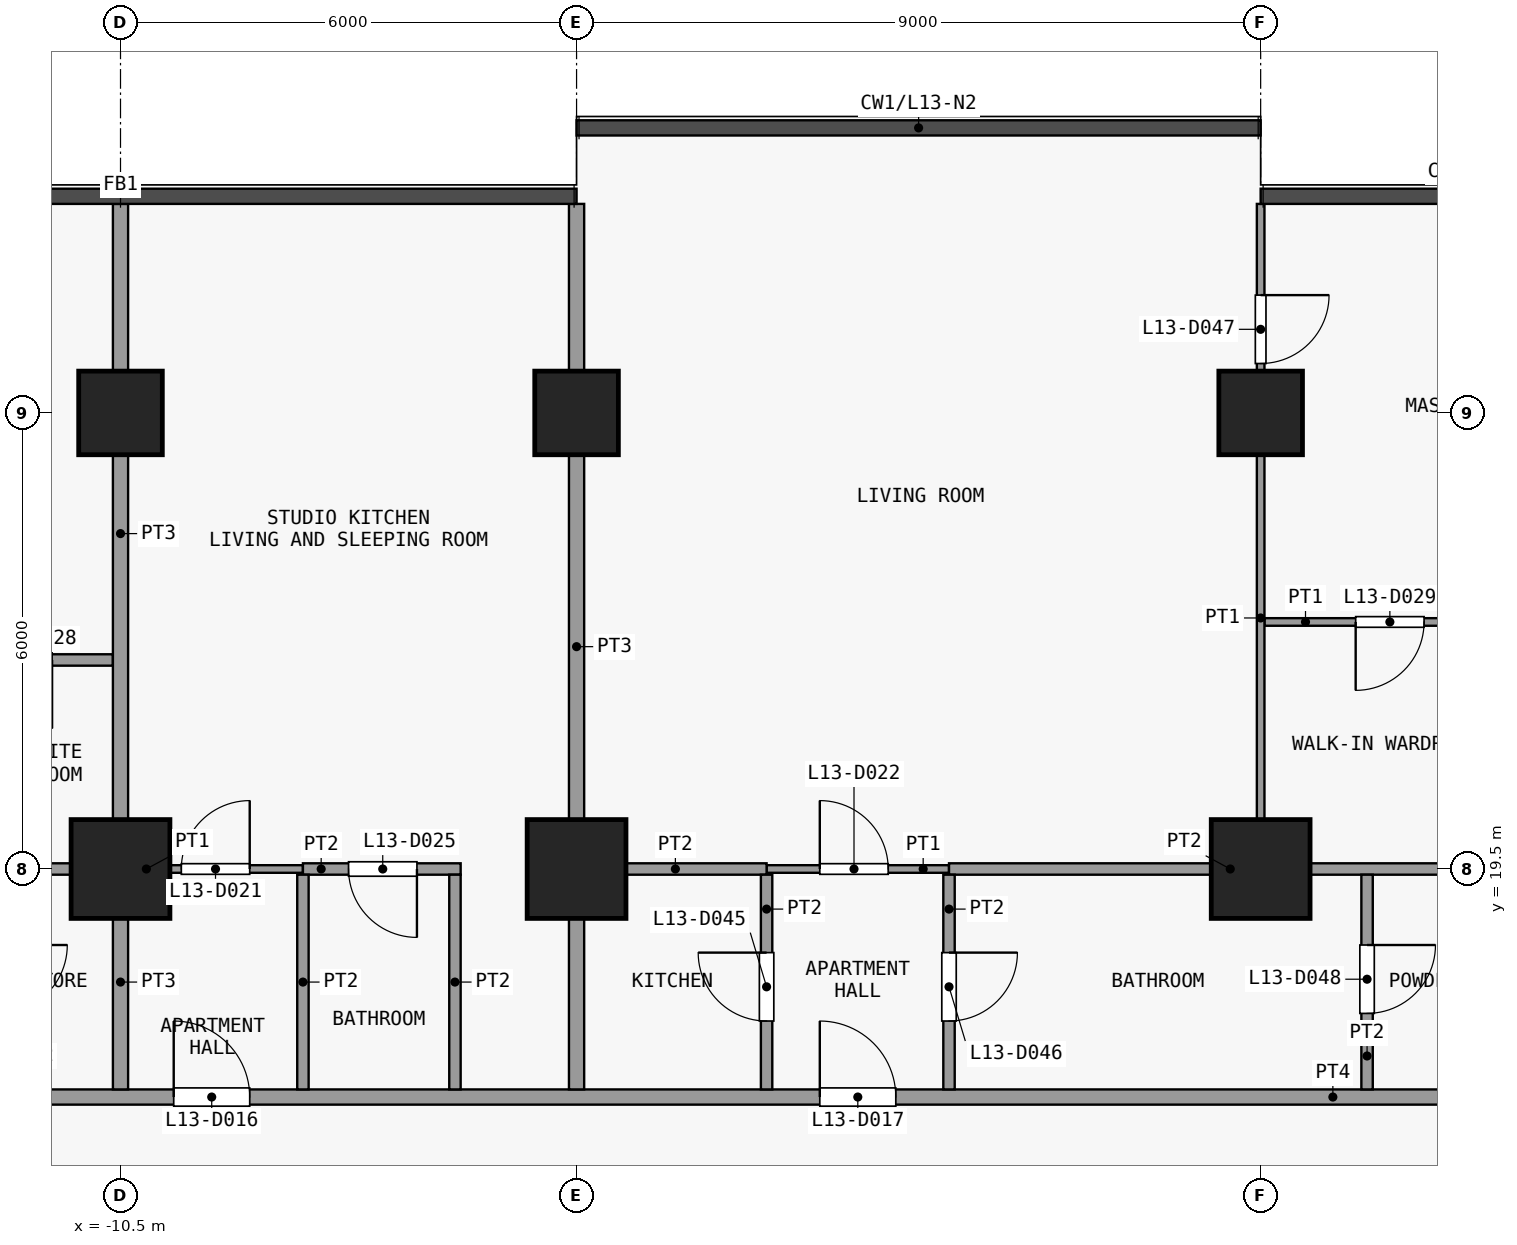
"""IFC4 building model, lengths in metres.
Left out: names, types, materials, properties, quantities, classifications, styles, units other than length and angle.
Written with IfcOpenShell. Run it as: python <this file> out.ifc"""

import sys

from ifc_helpers import new_model, si_unit, direction, frame, frame_2d, origin, origin_2d, place, context, subcontext, project, spatial, rectangle, extrude, element, fill, save


model = new_model("IFC4")
c1 = context("Model", 3, precision=1e-05, world=origin(), true_north=direction((0.0, 1.0)))
c2 = subcontext(c1, "Body", "Model", "MODEL_VIEW")
j1 = project(units=[si_unit("LENGTHUNIT", "METRE"), si_unit("PLANEANGLEUNIT", "RADIAN")], contexts=[c1])
p1 = place(None, origin())
s1 = spatial("IfcSite", under=j1, at=p1, CompositionType="ELEMENT")
p2 = place(p1, origin())
s2 = spatial("IfcBuilding", under=s1, at=p2, CompositionType="ELEMENT")
p3 = place(p2, frame((0.0, 0.0, 57.7)))
s3 = spatial("IfcBuildingStorey", under=s2, at=p3, CompositionType="ELEMENT", Elevation=57.7)
p4 = place(p3, frame((-10.5, 19.5, 0.0), z_axis=(0.0, 0.0, 1.0), x_axis=(1.0, 0.0, 0.0)))
e1 = element("IfcColumn", 1, at=p4, inside=s3, PredefinedType="COLUMN", context=c2, shape_type="SweptSolid", body=[
    extrude(rectangle(XDim=1.3, YDim=1.3, at=origin_2d()), origin(), (0.0, 0.0, 1.0), 3.6),
])
p5 = place(p3, frame((-10.5, 25.5, 0.0), z_axis=(0.0, 0.0, 1.0), x_axis=(1.0, 0.0, 0.0)))
e2 = element("IfcColumn", 2, at=p5, inside=s3, PredefinedType="COLUMN", context=c2, shape_type="SweptSolid", body=[
    extrude(rectangle(XDim=1.1, YDim=1.1, at=origin_2d()), origin(), (0.0, 0.0, 1.0), 3.6),
])
p6 = place(p3, frame((-4.5, 19.5, 0.0), z_axis=(0.0, 0.0, 1.0), x_axis=(1.0, 0.0, 0.0)))
e3 = element("IfcColumn", 3, at=p6, inside=s3, PredefinedType="COLUMN", context=c2, shape_type="SweptSolid", body=[
    extrude(rectangle(XDim=1.3, YDim=1.3, at=origin_2d()), origin(), (0.0, 0.0, 1.0), 3.6),
])
p7 = place(p3, frame((-4.5, 25.5, 0.0), z_axis=(0.0, 0.0, 1.0), x_axis=(1.0, 0.0, 0.0)))
e4 = element("IfcColumn", 4, at=p7, inside=s3, PredefinedType="COLUMN", context=c2, shape_type="SweptSolid", body=[
    extrude(rectangle(XDim=1.1, YDim=1.1, at=origin_2d()), origin(), (0.0, 0.0, 1.0), 3.6),
])
p8 = place(p3, frame((4.5, 19.5, 0.0), z_axis=(0.0, 0.0, 1.0), x_axis=(1.0, 0.0, 0.0)))
e5 = element("IfcColumn", 5, at=p8, inside=s3, PredefinedType="COLUMN", context=c2, shape_type="SweptSolid", body=[
    extrude(rectangle(XDim=1.3, YDim=1.3, at=origin_2d()), origin(), (0.0, 0.0, 1.0), 3.6),
])
p9 = place(p3, frame((4.5, 25.5, 0.0), z_axis=(0.0, 0.0, 1.0), x_axis=(1.0, 0.0, 0.0)))
e6 = element("IfcColumn", 6, at=p9, inside=s3, PredefinedType="COLUMN", context=c2, shape_type="SweptSolid", body=[
    extrude(rectangle(XDim=1.1, YDim=1.1, at=origin_2d()), origin(), (0.0, 0.0, 1.0), 3.6),
])
p10 = place(p3, frame((-25.35, 16.5, 0.0), z_axis=(0.0, 0.0, 1.0), x_axis=(1.0, 0.0, 0.0)))
e7 = element("IfcWall", 7, at=p10, inside=s3, PredefinedType="PARTITIONING", context=c2, shape_type="SweptSolid", body=[
    extrude(rectangle(XDim=50.7, YDim=0.2, at=frame_2d((25.35, 0.0))), origin(), (0.0, 0.0, 1.0), 3.3),
])
p11 = place(p10, frame((7.05, 0.0, 0.0)))
e8 = element("IfcOpeningElement", 8, at=p11, cuts=e7, PredefinedType="OPENING", context=c2, shape_type="SweptSolid", body=[
    extrude(rectangle(XDim=1.0, YDim=2.1, at=frame_2d((0.5, 1.05))), frame((0.0, 0.11, 0.0), z_axis=(0.0, -1.0, 0.0), x_axis=(1.0, 0.0, 0.0)), (0.0, 0.0, 1.0), 0.22),
])
p12 = place(p10, frame((15.55, 0.0, 0.0)))
e9 = element("IfcOpeningElement", 9, at=p12, cuts=e7, PredefinedType="OPENING", context=c2, shape_type="SweptSolid", body=[
    extrude(rectangle(XDim=1.0, YDim=2.1, at=frame_2d((0.5, 1.05))), frame((0.0, 0.11, 0.0), z_axis=(0.0, -1.0, 0.0), x_axis=(1.0, 0.0, 0.0)), (0.0, 0.0, 1.0), 0.22),
])
p13 = place(p10, frame((24.05, 0.0, 0.0)))
e10 = element("IfcOpeningElement", 10, at=p13, cuts=e7, PredefinedType="OPENING", context=c2, shape_type="SweptSolid", body=[
    extrude(rectangle(XDim=1.0, YDim=2.1, at=frame_2d((0.5, 1.05))), frame((0.0, 0.11, 0.0), z_axis=(0.0, -1.0, 0.0), x_axis=(1.0, 0.0, 0.0)), (0.0, 0.0, 1.0), 0.22),
])
p14 = place(p10, frame((36.55, 0.0, 0.0)))
e11 = element("IfcOpeningElement", 11, at=p14, cuts=e7, PredefinedType="OPENING", context=c2, shape_type="SweptSolid", body=[
    extrude(rectangle(XDim=1.0, YDim=2.1, at=frame_2d((0.5, 1.05))), frame((0.0, 0.11, 0.0), z_axis=(0.0, -1.0, 0.0), x_axis=(1.0, 0.0, 0.0)), (0.0, 0.0, 1.0), 0.22),
])
p15 = place(p10, frame((45.05, 0.0, 0.0)))
e12 = element("IfcOpeningElement", 12, at=p15, cuts=e7, PredefinedType="OPENING", context=c2, shape_type="SweptSolid", body=[
    extrude(rectangle(XDim=1.0, YDim=2.1, at=frame_2d((0.5, 1.05))), frame((0.0, 0.11, 0.0), z_axis=(0.0, -1.0, 0.0), x_axis=(1.0, 0.0, 0.0)), (0.0, 0.0, 1.0), 0.22),
])
p16 = place(p3, frame((-10.5, 19.5, 0.0), z_axis=(0.0, 0.0, 1.0), x_axis=(1.0, 0.0, 0.0)))
e13 = element("IfcWall", 13, at=p16, inside=s3, PredefinedType="PARTITIONING", context=c2, shape_type="SweptSolid", body=[
    extrude(rectangle(XDim=2.4, YDim=0.1, at=frame_2d((1.2, 0.0))), origin(), (0.0, 0.0, 1.0), 3.3),
])
p17 = place(p16, frame((0.8, 0.0, 0.0)))
e14 = element("IfcOpeningElement", 14, at=p17, cuts=e13, PredefinedType="OPENING", context=c2, shape_type="SweptSolid", body=[
    extrude(rectangle(XDim=0.9, YDim=2.1, at=frame_2d((0.45, 1.05))), frame((0.0, 0.06, 0.0), z_axis=(0.0, -1.0, 0.0), x_axis=(1.0, 0.0, 0.0)), (0.0, 0.0, 1.0), 0.12),
])
p18 = place(p3, frame((-2.0, 19.5, 0.0), z_axis=(0.0, 0.0, 1.0), x_axis=(1.0, 0.0, 0.0)))
e15 = element("IfcWall", 15, at=p18, inside=s3, PredefinedType="PARTITIONING", context=c2, shape_type="SweptSolid", body=[
    extrude(rectangle(XDim=2.4, YDim=0.1, at=frame_2d((1.2, 0.0))), origin(), (0.0, 0.0, 1.0), 3.3),
])
p19 = place(p18, frame((0.7, 0.0, 0.0)))
e16 = element("IfcOpeningElement", 16, at=p19, cuts=e15, PredefinedType="OPENING", context=c2, shape_type="SweptSolid", body=[
    extrude(rectangle(XDim=0.9, YDim=2.1, at=frame_2d((0.45, 1.05))), frame((0.0, 0.06, 0.0), z_axis=(0.0, -1.0, 0.0), x_axis=(1.0, 0.0, 0.0)), (0.0, 0.0, 1.0), 0.12),
])
p20 = place(p3, frame((-13.2, 19.5, 0.0), z_axis=(0.0, 0.0, 1.0), x_axis=(1.0, 0.0, 0.0)))
e17 = element("IfcWall", 17, at=p20, inside=s3, PredefinedType="PARTITIONING", context=c2, shape_type="SweptSolid", body=[
    extrude(rectangle(XDim=2.7, YDim=0.15, at=frame_2d((1.35, 0.0))), origin(), (0.0, 0.0, 1.0), 3.3),
])
p21 = place(p3, frame((-8.1, 19.5, 0.0), z_axis=(0.0, 0.0, 1.0), x_axis=(1.0, 0.0, 0.0)))
e18 = element("IfcWall", 18, at=p21, inside=s3, PredefinedType="PARTITIONING", context=c2, shape_type="SweptSolid", body=[
    extrude(rectangle(XDim=2.075, YDim=0.15, at=frame_2d((1.038, 0.0))), origin(), (0.0, 0.0, 1.0), 3.3),
])
p22 = place(p21, frame((0.6, 0.0, 0.0)))
e19 = element("IfcOpeningElement", 19, at=p22, cuts=e18, PredefinedType="OPENING", context=c2, shape_type="SweptSolid", body=[
    extrude(rectangle(XDim=0.9, YDim=2.1, at=frame_2d((0.45, 1.05))), frame((0.0, 0.085, 0.0), z_axis=(0.0, -1.0, 0.0), x_axis=(1.0, 0.0, 0.0)), (0.0, 0.0, 1.0), 0.17),
])
p23 = place(p3, frame((-4.4, 19.5, 0.0), z_axis=(0.0, 0.0, 1.0), x_axis=(1.0, 0.0, 0.0)))
e20 = element("IfcWall", 20, at=p23, inside=s3, PredefinedType="PARTITIONING", context=c2, shape_type="SweptSolid", body=[
    extrude(rectangle(XDim=2.4, YDim=0.15, at=frame_2d((1.2, 0.0))), origin(), (0.0, 0.0, 1.0), 3.3),
])
p24 = place(p3, frame((0.4, 19.5, 0.0), z_axis=(0.0, 0.0, 1.0), x_axis=(1.0, 0.0, 0.0)))
e21 = element("IfcWall", 21, at=p24, inside=s3, PredefinedType="PARTITIONING", context=c2, shape_type="SweptSolid", body=[
    extrude(rectangle(XDim=7.4, YDim=0.15, at=frame_2d((3.7, 0.0))), origin(), (0.0, 0.0, 1.0), 3.3),
])
p25 = place(p3, frame((-13.2, 22.25, 0.0), z_axis=(0.0, 0.0, 1.0), x_axis=(1.0, 0.0, 0.0)))
e22 = element("IfcWall", 22, at=p25, inside=s3, PredefinedType="PARTITIONING", context=c2, shape_type="SweptSolid", body=[
    extrude(rectangle(XDim=2.6, YDim=0.15, at=frame_2d((1.3, 0.0))), origin(), (0.0, 0.0, 1.0), 3.3),
])
p26 = place(p25, frame((0.9, 0.0, 0.0)))
e23 = element("IfcOpeningElement", 23, at=p26, cuts=e22, PredefinedType="OPENING", context=c2, shape_type="SweptSolid", body=[
    extrude(rectangle(XDim=0.9, YDim=2.1, at=frame_2d((0.45, 1.05))), frame((0.0, 0.085, 0.0), z_axis=(0.0, -1.0, 0.0), x_axis=(1.0, 0.0, 0.0)), (0.0, 0.0, 1.0), 0.17),
])
p27 = place(p3, frame((4.55, 22.75, 0.0), z_axis=(0.0, 0.0, 1.0), x_axis=(1.0, 0.0, 0.0)))
e24 = element("IfcWall", 24, at=p27, inside=s3, PredefinedType="PARTITIONING", context=c2, shape_type="SweptSolid", body=[
    extrude(rectangle(XDim=3.25, YDim=0.1, at=frame_2d((1.625, 0.0))), origin(), (0.0, 0.0, 1.0), 3.3),
])
p28 = place(p27, frame((1.2, 0.0, 0.0)))
e25 = element("IfcOpeningElement", 25, at=p28, cuts=e24, PredefinedType="OPENING", context=c2, shape_type="SweptSolid", body=[
    extrude(rectangle(XDim=0.9, YDim=2.1, at=frame_2d((0.45, 1.05))), frame((0.0, 0.06, 0.0), z_axis=(0.0, -1.0, 0.0), x_axis=(1.0, 0.0, 0.0)), (0.0, 0.0, 1.0), 0.12),
])
p29 = place(p3, frame((-10.5, 16.6, 0.0), z_axis=(0.0, 0.0, 1.0), x_axis=(0.0, 1.0, 0.0)))
e26 = element("IfcWall", 26, at=p29, inside=s3, PredefinedType="PARTITIONING", context=c2, shape_type="SweptSolid", body=[
    extrude(rectangle(XDim=2.825, YDim=0.2, at=frame_2d((1.413, 0.0))), origin(), (0.0, 0.0, 1.0), 3.3),
])
p30 = place(p3, frame((-10.5, 19.575, 0.0), z_axis=(0.0, 0.0, 1.0), x_axis=(0.0, 1.0, 0.0)))
e27 = element("IfcWall", 27, at=p30, inside=s3, PredefinedType="PARTITIONING", context=c2, shape_type="SweptSolid", body=[
    extrude(rectangle(XDim=8.675, YDim=0.2, at=frame_2d((4.337, 0.0))), origin(), (0.0, 0.0, 1.0), 3.3),
])
for number, where, z_axis, x_axis in (
    (28, (-8.1, 16.6, 0.0), (0.0, 0.0, 1.0), (0.0, 1.0, 0.0)),
    (29, (-6.1, 16.6, 0.0), (0.0, 0.0, 1.0), (0.0, 1.0, 0.0)),
):
    element("IfcWall", number, at=place(p3, frame(where, z_axis=z_axis, x_axis=x_axis)), inside=s3, PredefinedType="PARTITIONING", context=c2, shape_type="SweptSolid", body=[
        extrude(rectangle(XDim=2.825, YDim=0.15, at=frame_2d((1.413, 0.0))), origin(), (0.0, 0.0, 1.0), 3.3),
    ])
p31 = place(p3, frame((-4.5, 16.6, 0.0), z_axis=(0.0, 0.0, 1.0), x_axis=(0.0, 1.0, 0.0)))
e30 = element("IfcWall", 30, at=p31, inside=s3, PredefinedType="PARTITIONING", context=c2, shape_type="SweptSolid", body=[
    extrude(rectangle(XDim=11.65, YDim=0.2, at=frame_2d((5.825, 0.0))), origin(), (0.0, 0.0, 1.0), 3.3),
])
p32 = place(p3, frame((-2.0, 16.6, 0.0), z_axis=(0.0, 0.0, 1.0), x_axis=(0.0, 1.0, 0.0)))
e31 = element("IfcWall", 31, at=p32, inside=s3, PredefinedType="PARTITIONING", context=c2, shape_type="SweptSolid", body=[
    extrude(rectangle(XDim=2.825, YDim=0.15, at=frame_2d((1.413, 0.0))), origin(), (0.0, 0.0, 1.0), 3.3),
])
p33 = place(p32, frame((0.9, 0.0, 0.0)))
e32 = element("IfcOpeningElement", 32, at=p33, cuts=e31, PredefinedType="OPENING", context=c2, shape_type="SweptSolid", body=[
    extrude(rectangle(XDim=0.9, YDim=2.1, at=frame_2d((0.45, 1.05))), frame((0.0, 0.085, 0.0), z_axis=(0.0, -1.0, 0.0), x_axis=(1.0, 0.0, 0.0)), (0.0, 0.0, 1.0), 0.17),
])
p34 = place(p3, frame((0.4, 16.6, 0.0), z_axis=(0.0, 0.0, 1.0), x_axis=(0.0, 1.0, 0.0)))
e33 = element("IfcWall", 33, at=p34, inside=s3, PredefinedType="PARTITIONING", context=c2, shape_type="SweptSolid", body=[
    extrude(rectangle(XDim=2.825, YDim=0.15, at=frame_2d((1.413, 0.0))), origin(), (0.0, 0.0, 1.0), 3.3),
])
p35 = place(p34, frame((0.9, 0.0, 0.0)))
e34 = element("IfcOpeningElement", 34, at=p35, cuts=e33, PredefinedType="OPENING", context=c2, shape_type="SweptSolid", body=[
    extrude(rectangle(XDim=0.9, YDim=2.1, at=frame_2d((0.45, 1.05))), frame((0.0, 0.085, 0.0), z_axis=(0.0, -1.0, 0.0), x_axis=(1.0, 0.0, 0.0)), (0.0, 0.0, 1.0), 0.17),
])
p36 = place(p3, frame((4.5, 19.575, 0.0), z_axis=(0.0, 0.0, 1.0), x_axis=(0.0, 1.0, 0.0)))
e35 = element("IfcWall", 35, at=p36, inside=s3, PredefinedType="PARTITIONING", context=c2, shape_type="SweptSolid", body=[
    extrude(rectangle(XDim=8.675, YDim=0.1, at=frame_2d((4.337, 0.0))), origin(), (0.0, 0.0, 1.0), 3.3),
])
p37 = place(p36, frame((6.575, 0.0, 0.0)))
e36 = element("IfcOpeningElement", 36, at=p37, cuts=e35, PredefinedType="OPENING", context=c2, shape_type="SweptSolid", body=[
    extrude(rectangle(XDim=0.9, YDim=2.1, at=frame_2d((0.45, 1.05))), frame((0.0, 0.06, 0.0), z_axis=(0.0, -1.0, 0.0), x_axis=(1.0, 0.0, 0.0)), (0.0, 0.0, 1.0), 0.12),
])
p38 = place(p3, frame((5.9, 16.6, 0.0), z_axis=(0.0, 0.0, 1.0), x_axis=(0.0, 1.0, 0.0)))
e37 = element("IfcWall", 37, at=p38, inside=s3, PredefinedType="PARTITIONING", context=c2, shape_type="SweptSolid", body=[
    extrude(rectangle(XDim=2.825, YDim=0.15, at=frame_2d((1.413, 0.0))), origin(), (0.0, 0.0, 1.0), 3.3),
])
p39 = place(p38, frame((1.0, 0.0, 0.0)))
e38 = element("IfcOpeningElement", 38, at=p39, cuts=e37, PredefinedType="OPENING", context=c2, shape_type="SweptSolid", body=[
    extrude(rectangle(XDim=0.9, YDim=2.1, at=frame_2d((0.45, 1.05))), frame((0.0, 0.085, 0.0), z_axis=(0.0, -1.0, 0.0), x_axis=(1.0, 0.0, 0.0)), (0.0, 0.0, 1.0), 0.17),
])
p40 = place(p12, origin())
e39 = element("IfcDoor", 39, at=p40, inside=s3, OperationType="SINGLE_SWING_RIGHT", PredefinedType="DOOR", context=c2, shape_type="SweptSolid", body=[
    extrude(rectangle(XDim=1.0, YDim=2.1, at=frame_2d((0.5, 1.05))), frame((0.0, 0.025, 0.0), z_axis=(0.0, -1.0, 0.0), x_axis=(1.0, 0.0, 0.0)), (0.0, 0.0, 1.0), 0.05),
])
fill(e9, e39)
p41 = place(p13, origin())
e40 = element("IfcDoor", 40, at=p41, inside=s3, OperationType="SINGLE_SWING_RIGHT", PredefinedType="DOOR", context=c2, shape_type="SweptSolid", body=[
    extrude(rectangle(XDim=1.0, YDim=2.1, at=frame_2d((0.5, 1.05))), frame((0.0, 0.025, 0.0), z_axis=(0.0, -1.0, 0.0), x_axis=(1.0, 0.0, 0.0)), (0.0, 0.0, 1.0), 0.05),
])
fill(e10, e40)
p42 = place(p17, origin())
e41 = element("IfcDoor", 41, at=p42, inside=s3, OperationType="SINGLE_SWING_LEFT", PredefinedType="DOOR", context=c2, shape_type="SweptSolid", body=[
    extrude(rectangle(XDim=0.9, YDim=2.1, at=frame_2d((0.45, 1.05))), frame((0.0, 0.025, 0.0), z_axis=(0.0, -1.0, 0.0), x_axis=(1.0, 0.0, 0.0)), (0.0, 0.0, 1.0), 0.05),
])
fill(e14, e41)
p43 = place(p19, origin())
e42 = element("IfcDoor", 42, at=p43, inside=s3, OperationType="SINGLE_SWING_RIGHT", PredefinedType="DOOR", context=c2, shape_type="SweptSolid", body=[
    extrude(rectangle(XDim=0.9, YDim=2.1, at=frame_2d((0.45, 1.05))), frame((0.0, 0.025, 0.0), z_axis=(0.0, -1.0, 0.0), x_axis=(1.0, 0.0, 0.0)), (0.0, 0.0, 1.0), 0.05),
])
fill(e16, e42)
p44 = place(p22, origin())
e43 = element("IfcDoor", 43, at=p44, inside=s3, OperationType="SINGLE_SWING_RIGHT", PredefinedType="DOOR", context=c2, shape_type="SweptSolid", body=[
    extrude(rectangle(XDim=0.9, YDim=2.1, at=frame_2d((0.45, 1.05))), frame((0.0, 0.025, 0.0), z_axis=(0.0, -1.0, 0.0), x_axis=(1.0, 0.0, 0.0)), (0.0, 0.0, 1.0), 0.05),
])
fill(e19, e43)
p45 = place(p28, origin())
e44 = element("IfcDoor", 44, at=p45, inside=s3, OperationType="SINGLE_SWING_LEFT", PredefinedType="DOOR", context=c2, shape_type="SweptSolid", body=[
    extrude(rectangle(XDim=0.9, YDim=2.1, at=frame_2d((0.45, 1.05))), frame((0.0, 0.025, 0.0), z_axis=(0.0, -1.0, 0.0), x_axis=(1.0, 0.0, 0.0)), (0.0, 0.0, 1.0), 0.05),
])
fill(e25, e44)
p46 = place(p33, origin())
e45 = element("IfcDoor", 45, at=p46, inside=s3, OperationType="SINGLE_SWING_LEFT", PredefinedType="DOOR", context=c2, shape_type="SweptSolid", body=[
    extrude(rectangle(XDim=0.9, YDim=2.1, at=frame_2d((0.45, 1.05))), frame((0.0, 0.025, 0.0), z_axis=(0.0, -1.0, 0.0), x_axis=(1.0, 0.0, 0.0)), (0.0, 0.0, 1.0), 0.05),
])
fill(e32, e45)
p47 = place(p35, origin())
e46 = element("IfcDoor", 46, at=p47, inside=s3, OperationType="SINGLE_SWING_RIGHT", PredefinedType="DOOR", context=c2, shape_type="SweptSolid", body=[
    extrude(rectangle(XDim=0.9, YDim=2.1, at=frame_2d((0.45, 1.05))), frame((0.0, 0.025, 0.0), z_axis=(0.0, -1.0, 0.0), x_axis=(1.0, 0.0, 0.0)), (0.0, 0.0, 1.0), 0.05),
])
fill(e34, e46)
p48 = place(p37, origin())
e47 = element("IfcDoor", 47, at=p48, inside=s3, OperationType="SINGLE_SWING_RIGHT", PredefinedType="DOOR", context=c2, shape_type="SweptSolid", body=[
    extrude(rectangle(XDim=0.9, YDim=2.1, at=frame_2d((0.45, 1.05))), frame((0.0, 0.025, 0.0), z_axis=(0.0, -1.0, 0.0), x_axis=(1.0, 0.0, 0.0)), (0.0, 0.0, 1.0), 0.05),
])
fill(e36, e47)
p49 = place(p39, origin())
e48 = element("IfcDoor", 48, at=p49, inside=s3, OperationType="SINGLE_SWING_RIGHT", PredefinedType="DOOR", context=c2, shape_type="SweptSolid", body=[
    extrude(rectangle(XDim=0.9, YDim=2.1, at=frame_2d((0.45, 1.05))), frame((0.0, 0.025, 0.0), z_axis=(0.0, -1.0, 0.0), x_axis=(1.0, 0.0, 0.0)), (0.0, 0.0, 1.0), 0.05),
])
fill(e38, e48)
save(model, sys.argv[1])
